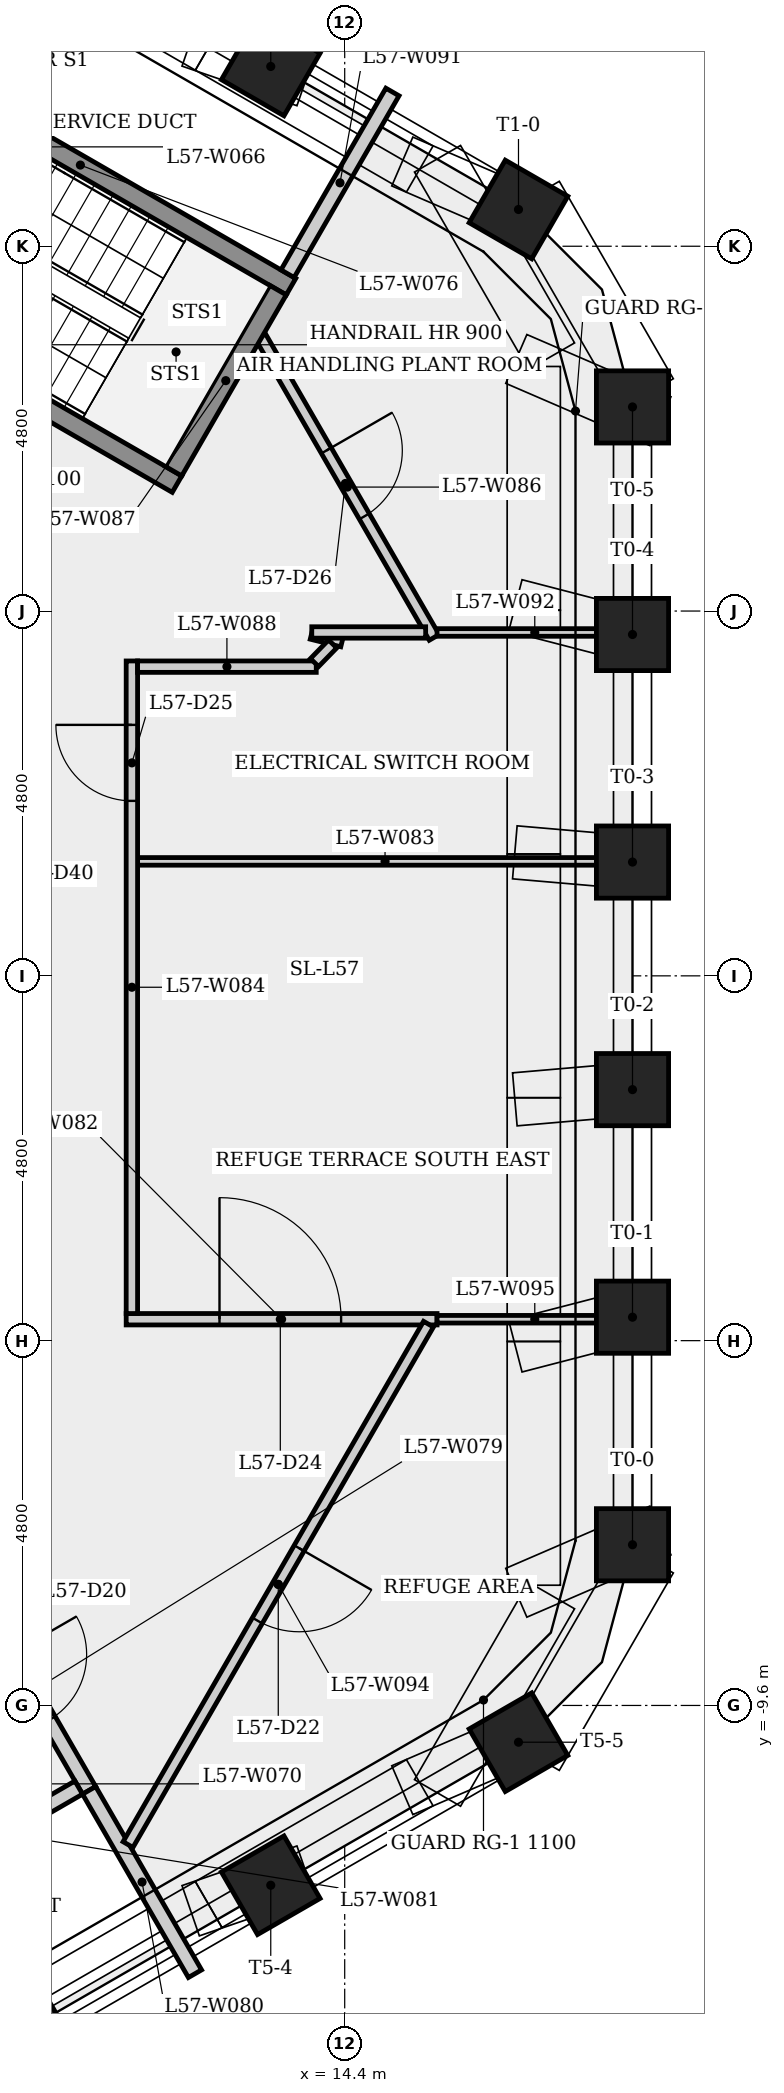
"""IFC4 building model, lengths in metres.
Left out: names, types, materials, properties, quantities, classifications, styles, units other than length and angle.
Written with IfcOpenShell. Run it as: python <this file> out.ifc"""

import sys

from ifc_helpers import new_model, si_unit, direction, frame, frame_2d, origin, origin_2d, place, context, subcontext, project, spatial, rectangle, extrude, element, fill, save


model = new_model("IFC4")
c1 = context("Model", 3, precision=1e-05, world=origin(), true_north=direction((0.0, 1.0)))
c2 = subcontext(c1, "Body", "Model", "MODEL_VIEW")
j1 = project(units=[si_unit("LENGTHUNIT", "METRE"), si_unit("PLANEANGLEUNIT", "RADIAN")], contexts=[c1])
p1 = place(None, origin())
s1 = spatial("IfcSite", under=j1, at=p1, CompositionType="ELEMENT")
p2 = place(p1, origin())
s2 = spatial("IfcBuilding", under=s1, at=p2, CompositionType="ELEMENT")
p3 = place(p2, frame((0.0, 0.0, 214.1)))
s3 = spatial("IfcBuildingStorey", under=s2, at=p3, CompositionType="ELEMENT", Elevation=214.1)
for number, where, z_axis, x_axis in (
    (1, (18.187, -7.486, 0.0), (0.0, 0.0, 1.0), (1.0, 0.0, 0.0)),
    (2, (18.187, -4.491, 0.0), (0.0, 0.0, 1.0), (1.0, 0.0, 0.0)),
    (3, (18.187, -1.497, 0.0), (0.0, 0.0, 1.0), (1.0, 0.0, 0.0)),
    (4, (18.187, 1.497, 0.0), (0.0, 0.0, 1.0), (1.0, 0.0, 0.0)),
    (5, (18.187, 4.491, 0.0), (0.0, 0.0, 1.0), (1.0, 0.0, 0.0)),
    (6, (18.187, 7.486, 0.0), (0.0, 0.0, 1.0), (1.0, 0.0, 0.0)),
    (7, (16.687, 10.084, 0.0), (0.0, 0.0, 1.0), (0.5, 0.866, 0.0)),
    (8, (13.427, 11.966, 0.0), (0.0, 0.0, 1.0), (0.5, 0.866, 0.0)),
    (9, (10.168, -13.847, 0.0), (0.0, 0.0, 1.0), (0.5, -0.866, 0.0)),
    (10, (13.427, -11.966, 0.0), (0.0, 0.0, 1.0), (0.5, -0.866, 0.0)),
    (11, (16.687, -10.084, 0.0), (0.0, 0.0, 1.0), (0.5, -0.866, 0.0)),
):
    element("IfcColumn", number, at=place(p3, frame(where, z_axis=z_axis, x_axis=x_axis)), inside=s3, PredefinedType="COLUMN", context=c2, shape_type="SweptSolid", body=[
        extrude(rectangle(XDim=0.95, YDim=0.95, at=origin_2d()), origin(), (0.0, 0.0, 1.0), 4.45),
    ])
p4 = place(p3, frame((8.151, 12.268, 0.0), z_axis=(0.0, 0.0, 1.0), x_axis=(0.866025499775, -0.499999833739, 0.0)))
e12 = element("IfcWall", 12, at=p4, inside=s3, PredefinedType="SHEAR", context=c2, shape_type="SweptSolid", body=[
    extrude(rectangle(XDim=6.4, YDim=0.25, at=frame_2d((3.2, 0.0))), origin(), (0.0, 0.0, 1.0), 4.45),
])
p5 = place(p3, frame((9.537, -8.119, 0.0), z_axis=(0.0, 0.0, 1.0), x_axis=(0.499990139034, -0.866031096941, 0.0)))
e13 = element("IfcWall", 13, at=p5, inside=s3, PredefinedType="PARTITIONING", context=c2, shape_type="SweptSolid", body=[
    extrude(rectangle(XDim=3.0, YDim=0.2, at=frame_2d((1.5, 0.0))), origin(), (0.0, 0.0, 1.0), 4.45),
])
p6 = place(p5, frame((0.935, 0.0, 0.0)))
e14 = element("IfcOpeningElement", 14, at=p6, cuts=e13, PredefinedType="OPENING", context=c2, shape_type="SweptSolid", body=[
    extrude(rectangle(XDim=1.0, YDim=2.1, at=frame_2d((0.5, 1.05))), frame((0.0, 0.11, 0.0), z_axis=(0.0, -1.0, 0.0), x_axis=(1.0, 0.0, 0.0)), (0.0, 0.0, 1.0), 0.22),
])
p7 = place(p3, frame((11.037, -10.717, 0.0), z_axis=(0.0, 0.0, 1.0), x_axis=(0.500013277472, -0.866017737897, 0.0)))
e15 = element("IfcWall", 15, at=p7, inside=s3, PredefinedType="PLUMBINGWALL", context=c2, shape_type="SweptSolid", body=[
    extrude(rectangle(XDim=2.786, YDim=0.2, at=frame_2d((1.393, 0.0))), origin(), (0.0, 0.0, 1.0), 4.45),
])
p8 = place(p3, frame((10.901, -10.681, 0.0), z_axis=(0.0, 0.0, 1.0), x_axis=(-0.866007538022, -0.500030943131, 0.0)))
e16 = element("IfcWall", 16, at=p8, inside=s3, PredefinedType="PLUMBINGWALL", context=c2, shape_type="SweptSolid", body=[
    extrude(rectangle(XDim=2.375, YDim=0.2, at=frame_2d((1.188, 0.0))), origin(), (0.0, 0.0, 1.0), 4.45),
])
p9 = place(p3, frame((11.525, -4.518, 0.0), z_axis=(0.0, 0.0, 1.0), x_axis=(1.0, 0.0, 0.0)))
e17 = element("IfcWall", 17, at=p9, inside=s3, PredefinedType="PARTITIONING", context=c2, shape_type="SweptSolid", body=[
    extrude(rectangle(XDim=4.09, YDim=0.15, at=frame_2d((2.045, 0.0))), origin(), (0.0, 0.0, 1.0), 4.45),
])
p10 = place(p9, frame((1.228, 0.0, 0.0)))
e18 = element("IfcOpeningElement", 18, at=p10, cuts=e17, PredefinedType="OPENING", context=c2, shape_type="SweptSolid", body=[
    extrude(rectangle(XDim=1.6, YDim=2.1, at=frame_2d((0.8, 1.05))), frame((0.0, 0.085, 0.0), z_axis=(0.0, -1.0, 0.0), x_axis=(1.0, 0.0, 0.0)), (0.0, 0.0, 1.0), 0.17),
])
p11 = place(p3, frame((11.675, 1.506, 0.0), z_axis=(0.0, 0.0, 1.0), x_axis=(1.0, 0.0, 0.0)))
e19 = element("IfcWall", 19, at=p11, inside=s3, PredefinedType="PARTITIONING", context=c2, shape_type="SweptSolid", body=[
    extrude(rectangle(XDim=6.511, YDim=0.1, at=frame_2d((3.256, 0.0))), origin(), (0.0, 0.0, 1.0), 2.825),
])
p12 = place(p3, frame((11.6, -4.443, 0.0), z_axis=(0.0, 0.0, 1.0), x_axis=(0.0, 1.0, 0.0)))
e20 = element("IfcWall", 20, at=p12, inside=s3, PredefinedType="PARTITIONING", context=c2, shape_type="SweptSolid", body=[
    extrude(rectangle(XDim=8.586, YDim=0.15, at=frame_2d((4.293, 0.0))), origin(), (0.0, 0.0, 1.0), 4.45),
])
p13 = place(p12, frame((6.745, 0.0, 0.0)))
e21 = element("IfcOpeningElement", 21, at=p13, cuts=e20, PredefinedType="OPENING", context=c2, shape_type="SweptSolid", body=[
    extrude(rectangle(XDim=1.0, YDim=2.1, at=frame_2d((0.5, 1.05))), frame((0.0, 0.085, 0.0), z_axis=(0.0, -1.0, 0.0), x_axis=(1.0, 0.0, 0.0)), (0.0, 0.0, 1.0), 0.17),
])
p14 = place(p3, frame((12.194, 6.47, 0.0), z_axis=(0.0, 0.0, 1.0), x_axis=(-0.866025499775, 0.499999833739, 0.0)))
e22 = element("IfcWall", 22, at=p14, inside=s3, PredefinedType="SHEAR", context=c2, shape_type="SweptSolid", body=[
    extrude(rectangle(XDim=6.4, YDim=0.25, at=frame_2d((3.2, 0.0))), origin(), (0.0, 0.0, 1.0), 4.45),
])
p15 = place(p14, frame((5.25, 0.0, 0.0)))
e23 = element("IfcOpeningElement", 23, at=p15, cuts=e22, PredefinedType="OPENING", context=c2, shape_type="SweptSolid", body=[
    extrude(rectangle(XDim=1.0, YDim=2.1, at=frame_2d((0.5, 1.05))), frame((0.0, 0.135, 0.0), z_axis=(0.0, -1.0, 0.0), x_axis=(1.0, 0.0, 0.0)), (0.0, 0.0, 1.0), 0.27),
])
p16 = place(p3, frame((13.294, 8.409, 0.0), z_axis=(0.0, 0.0, 1.0), x_axis=(0.499990817114, -0.866030705461, 0.0)))
e24 = element("IfcWall", 24, at=p16, inside=s3, PredefinedType="PARTITIONING", context=c2, shape_type="SweptSolid", body=[
    extrude(rectangle(XDim=4.567, YDim=0.15, at=frame_2d((2.284, 0.0))), origin(), (0.0, 0.0, 1.0), 4.45),
])
p17 = place(p16, frame((1.729, 0.0, 0.0)))
e25 = element("IfcOpeningElement", 25, at=p17, cuts=e24, PredefinedType="OPENING", context=c2, shape_type="SweptSolid", body=[
    extrude(rectangle(XDim=1.0, YDim=2.1, at=frame_2d((0.5, 1.05))), frame((0.0, 0.085, 0.0), z_axis=(0.0, -1.0, 0.0), x_axis=(1.0, 0.0, 0.0)), (0.0, 0.0, 1.0), 0.17),
])
p18 = place(p3, frame((12.148, 6.641, 0.0), z_axis=(0.0, 0.0, 1.0), x_axis=(0.500034990121, 0.866005201286, 0.0)))
e26 = element("IfcWall", 26, at=p18, inside=s3, PredefinedType="SHEAR", context=c2, shape_type="SweptSolid", body=[
    extrude(rectangle(XDim=2.75, YDim=0.25, at=frame_2d((1.375, 0.0))), origin(), (0.0, 0.0, 1.0), 4.45),
])
p19 = place(p3, frame((14.026, 4.068, 0.0), z_axis=(0.0, 0.0, 1.0), x_axis=(-1.0, 0.0, 0.0)))
e27 = element("IfcWall", 27, at=p19, inside=s3, PredefinedType="PARTITIONING", context=c2, shape_type="SweptSolid", body=[
    extrude(rectangle(XDim=2.351, YDim=0.15, at=frame_2d((1.175, 0.0))), origin(), (0.0, 0.0, 1.0), 4.45),
])
p20 = place(p3, frame((13.965, 4.503, 0.0), z_axis=(0.0, 0.0, 1.0), x_axis=(0.970350209099, -0.241703272011, 0.0)))
e28 = element("IfcWall", 28, at=p20, inside=s3, PredefinedType="PARTITIONING", context=c2, shape_type="SweptSolid", body=[
    extrude(rectangle(XDim=0.414, YDim=0.15, at=frame_2d((0.207, 0.0))), origin(), (0.0, 0.0, 1.0), 4.45),
])
p21 = place(p3, frame((14.241, 4.367, 0.0), z_axis=(0.0, 0.0, 1.0), x_axis=(-0.697761385238, -0.7163302655, 0.0)))
e29 = element("IfcWall", 29, at=p21, inside=s3, PredefinedType="PARTITIONING", context=c2, shape_type="SweptSolid", body=[
    extrude(rectangle(XDim=0.342, YDim=0.15, at=frame_2d((0.171, 0.0))), origin(), (0.0, 0.0, 1.0), 4.45),
])
p22 = place(p3, frame((15.028, 11.63, 0.0), z_axis=(0.0, 0.0, 1.0), x_axis=(-0.500000584575, -0.86602506628, 0.0)))
e30 = element("IfcWall", 30, at=p22, inside=s3, PredefinedType="PLUMBINGWALL", context=c2, shape_type="SweptSolid", body=[
    extrude(rectangle(XDim=2.761, YDim=0.2, at=frame_2d((1.38, 0.0))), origin(), (0.0, 0.0, 1.0), 4.45),
])
p23 = place(p3, frame((15.615, 4.518, 0.0), z_axis=(0.0, 0.0, 1.0), x_axis=(1.0, 0.0, 0.0)))
e31 = element("IfcWall", 31, at=p23, inside=s3, PredefinedType="PARTITIONING", context=c2, shape_type="SweptSolid", body=[
    extrude(rectangle(XDim=2.572, YDim=0.1, at=frame_2d((1.286, 0.0))), origin(), (0.0, 0.0, 1.0), 2.825),
])
p24 = place(p3, frame((15.465, 4.518, 0.0), z_axis=(0.0, 0.0, 1.0), x_axis=(-1.0, 0.0, 0.0)))
e32 = element("IfcWall", 32, at=p24, inside=s3, PredefinedType="PARTITIONING", context=c2, shape_type="SweptSolid", body=[
    extrude(rectangle(XDim=1.498, YDim=0.15, at=frame_2d((0.749, 0.0))), origin(), (0.0, 0.0, 1.0), 4.45),
])
p25 = place(p3, frame((15.502, -4.583, 0.0), z_axis=(0.0, 0.0, 1.0), x_axis=(-0.499991531824, -0.866030292833, 0.0)))
e33 = element("IfcWall", 33, at=p25, inside=s3, PredefinedType="PARTITIONING", context=c2, shape_type="SweptSolid", body=[
    extrude(rectangle(XDim=7.906, YDim=0.15, at=frame_2d((3.953, 0.0))), origin(), (0.0, 0.0, 1.0), 4.45),
])
p26 = place(p25, frame((3.403, 0.0, 0.0)))
e34 = element("IfcOpeningElement", 34, at=p26, cuts=e33, PredefinedType="OPENING", context=c2, shape_type="SweptSolid", body=[
    extrude(rectangle(XDim=1.1, YDim=2.1, at=frame_2d((0.55, 1.05))), frame((0.0, 0.085, 0.0), z_axis=(0.0, -1.0, 0.0), x_axis=(1.0, 0.0, 0.0)), (0.0, 0.0, 1.0), 0.17),
])
p27 = place(p3, frame((15.615, -4.518, 0.0), z_axis=(0.0, 0.0, 1.0), x_axis=(1.0, 0.0, 0.0)))
e35 = element("IfcWall", 35, at=p27, inside=s3, PredefinedType="PARTITIONING", context=c2, shape_type="SweptSolid", body=[
    extrude(rectangle(XDim=2.572, YDim=0.1, at=frame_2d((1.286, 0.0))), origin(), (0.0, 0.0, 1.0), 2.825),
])
p28 = place(p26, origin())
e36 = element("IfcDoor", 36, at=p28, inside=s3, OperationType="SINGLE_SWING_LEFT", PredefinedType="DOOR", context=c2, shape_type="SweptSolid", body=[
    extrude(rectangle(XDim=1.1, YDim=2.1, at=frame_2d((0.55, 1.05))), frame((0.0, 0.025, 0.0), z_axis=(0.0, -1.0, 0.0), x_axis=(1.0, 0.0, 0.0)), (0.0, 0.0, 1.0), 0.05),
])
fill(e34, e36)
p29 = place(p10, origin())
e37 = element("IfcDoor", 37, at=p29, inside=s3, OperationType="SINGLE_SWING_LEFT", PredefinedType="DOOR", context=c2, shape_type="SweptSolid", body=[
    extrude(rectangle(XDim=1.6, YDim=2.1, at=frame_2d((0.8, 1.05))), frame((0.0, 0.025, 0.0), z_axis=(0.0, -1.0, 0.0), x_axis=(1.0, 0.0, 0.0)), (0.0, 0.0, 1.0), 0.05),
])
fill(e18, e37)
p30 = place(p13, origin())
e38 = element("IfcDoor", 38, at=p30, inside=s3, OperationType="SINGLE_SWING_RIGHT", PredefinedType="DOOR", context=c2, shape_type="SweptSolid", body=[
    extrude(rectangle(XDim=1.0, YDim=2.1, at=frame_2d((0.5, 1.05))), frame((0.0, 0.025, 0.0), z_axis=(0.0, -1.0, 0.0), x_axis=(1.0, 0.0, 0.0)), (0.0, 0.0, 1.0), 0.05),
])
fill(e21, e38)
p31 = place(p17, origin())
e39 = element("IfcDoor", 39, at=p31, inside=s3, OperationType="SINGLE_SWING_LEFT", PredefinedType="DOOR", context=c2, shape_type="SweptSolid", body=[
    extrude(rectangle(XDim=1.0, YDim=2.1, at=frame_2d((0.5, 1.05))), frame((0.0, 0.025, 0.0), z_axis=(0.0, -1.0, 0.0), x_axis=(1.0, 0.0, 0.0)), (0.0, 0.0, 1.0), 0.05),
])
fill(e25, e39)
save(model, sys.argv[1])
